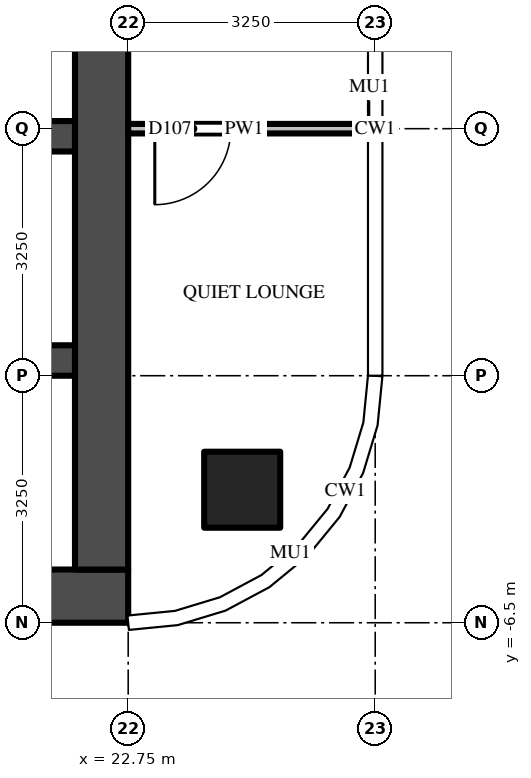
"""IFC4 building model, lengths in metres.
Left out: names, types, materials, properties, quantities, classifications, styles, units other than length and angle.
Written with IfcOpenShell. Run it as: python <this file> out.ifc"""

import sys

from ifc_helpers import new_model, si_unit, direction, frame, frame_2d, origin, origin_2d, place, context, subcontext, project, spatial, rectangle, extrude, source, transform, mapped, element, fill, save


model = new_model("IFC4")
c1 = context("Model", 3, precision=1e-05, world=origin(), true_north=direction((0.0, 1.0)))
c2 = subcontext(c1, "Body", "Model", "MODEL_VIEW")
j1 = project(units=[si_unit("LENGTHUNIT", "METRE"), si_unit("PLANEANGLEUNIT", "RADIAN")], contexts=[c1])
p1 = place(None, origin())
s1 = spatial("IfcSite", under=j1, at=p1, CompositionType="ELEMENT")
p2 = place(p1, origin())
s2 = spatial("IfcBuilding", under=s1, at=p2, CompositionType="ELEMENT")
p3 = place(p2, frame((0.0, 0.0, 279.4)))
s3 = spatial("IfcBuildingStorey", under=s2, at=p3, CompositionType="ELEMENT", Elevation=279.4)
m1 = source(origin(), c2, "Body", "SweptSolid", [
    extrude(rectangle(XDim=1.0, YDim=1.0, at=origin_2d()), origin(), (0.0, 0.0, 1.0), 3.9),
])
p4 = place(p3, frame((24.25, -4.75, 0.0), z_axis=(0.0, 0.0, 1.0), x_axis=(1.0, 0.0, 0.0)))
e1 = element("IfcColumn", 1, at=p4, inside=s3, PredefinedType="COLUMN", context=c2, shape_type="MappedRepresentation", body=[
    mapped(m1, transform((0.0, 0.0, 0.0))),
])
m2 = source(origin(), c2, "Body", "SweptSolid", [
    extrude(rectangle(XDim=16.65, YDim=0.7, at=frame_2d((8.325, 0.0))), origin(), (0.0, 0.0, 1.0), 3.7),
])
p5 = place(p3, frame((6.1, -6.15, 0.0), z_axis=(0.0, 0.0, 1.0), x_axis=(1.0, 0.0, 0.0)))
e2 = element("IfcWall", 2, at=p5, inside=s3, PredefinedType="SHEAR", context=c2, shape_type="MappedRepresentation", body=[
    mapped(m2, transform((0.0, 0.0, 0.0))),
])
m3 = source(origin(), c2, "Body", "SweptSolid", [
    extrude(rectangle(XDim=9.05, YDim=0.7, at=frame_2d((4.525, 0.0))), origin(), (0.0, 0.0, 1.0), 3.7),
])
p6 = place(p3, frame((22.4, -5.8, 0.0), z_axis=(0.0, 0.0, 1.0), x_axis=(0.0, 1.0, 0.0)))
e3 = element("IfcWall", 3, at=p6, inside=s3, PredefinedType="SHEAR", context=c2, shape_type="MappedRepresentation", body=[
    mapped(m3, transform((0.0, 0.0, 0.0))),
])
m4 = source(origin(), c2, "Body", "SweptSolid", [
    extrude(rectangle(XDim=14.85, YDim=0.4, at=frame_2d((7.425, 0.0))), origin(), (0.0, 0.0, 1.0), 3.7),
])
p7 = place(p3, frame((7.2, -0.1, 0.0), z_axis=(0.0, 0.0, 1.0), x_axis=(1.0, 0.0, 0.0)))
e4 = element("IfcWall", 4, at=p7, inside=s3, PredefinedType="SHEAR", context=c2, shape_type="MappedRepresentation", body=[
    mapped(m4, transform((0.0, 0.0, 0.0))),
])
m5 = source(origin(), c2, "Body", "SweptSolid", [
    extrude(rectangle(XDim=1.0, YDim=2.1, at=frame_2d((0.5, 1.05))), frame((0.0, 0.21, 0.0), z_axis=(0.0, -1.0, 0.0), x_axis=(1.0, 0.0, 0.0)), (0.0, 0.0, 1.0), 0.42),
])
p8 = place(p7, frame((7.9, 0.0, 0.0)))
e5 = element("IfcOpeningElement", 5, at=p8, cuts=e4, PredefinedType="OPENING", context=c2, shape_type="MappedRepresentation", body=[
    mapped(m5, transform((0.0, 0.0, 0.0))),
])
m6 = source(origin(), c2, "Body", "SweptSolid", [
    extrude(rectangle(XDim=5.7, YDim=0.4, at=frame_2d((2.85, 0.0))), origin(), (0.0, 0.0, 1.0), 3.7),
])
p9 = place(p3, frame((16.35, -3.05, 0.0), z_axis=(0.0, 0.0, 1.0), x_axis=(1.0, 0.0, 0.0)))
e6 = element("IfcWall", 6, at=p9, inside=s3, PredefinedType="SHEAR", context=c2, shape_type="MappedRepresentation", body=[
    mapped(m6, transform((0.0, 0.0, 0.0))),
])
m7 = source(origin(), c2, "Body", "SweptSolid", [
    extrude(rectangle(XDim=3.05, YDim=0.125, at=frame_2d((1.525, 0.0))), origin(), (0.0, 0.0, 1.0), 2.78),
])
p10 = place(p3, frame((25.8, 0.0, 0.0), z_axis=(0.0, 0.0, 1.0), x_axis=(-1.0, 0.0, 0.0)))
e7 = element("IfcWall", 7, at=p10, inside=s3, PredefinedType="PARTITIONING", context=c2, shape_type="MappedRepresentation", body=[
    mapped(m7, transform((0.0, 0.0, 0.0))),
])
m8 = source(origin(), c2, "Body", "SweptSolid", [
    extrude(rectangle(XDim=1.0, YDim=2.1, at=frame_2d((0.5, 1.05))), frame((0.0, 0.073, 0.0), z_axis=(0.0, -1.0, 0.0), x_axis=(1.0, 0.0, 0.0)), (0.0, 0.0, 1.0), 0.145),
])
p11 = place(p10, frame((1.7, 0.0, 0.0)))
e8 = element("IfcOpeningElement", 8, at=p11, cuts=e7, PredefinedType="OPENING", context=c2, shape_type="MappedRepresentation", body=[
    mapped(m8, transform((0.0, 0.0, 0.0))),
])
m9 = source(origin(), c2, "Body", "SweptSolid", [
    extrude(rectangle(XDim=1.0, YDim=2.1, at=frame_2d((0.5, 1.05))), frame((0.0, 0.025, 0.0), z_axis=(0.0, -1.0, 0.0), x_axis=(1.0, 0.0, 0.0)), (0.0, 0.0, 1.0), 0.05),
])
p12 = place(p11, origin())
e9 = element("IfcDoor", 9, at=p12, inside=s3, OperationType="SINGLE_SWING_RIGHT", PredefinedType="DOOR", context=c2, shape_type="MappedRepresentation", body=[
    mapped(m9, transform((0.0, 0.0, 0.0))),
])
fill(e8, e9)
save(model, sys.argv[1])
